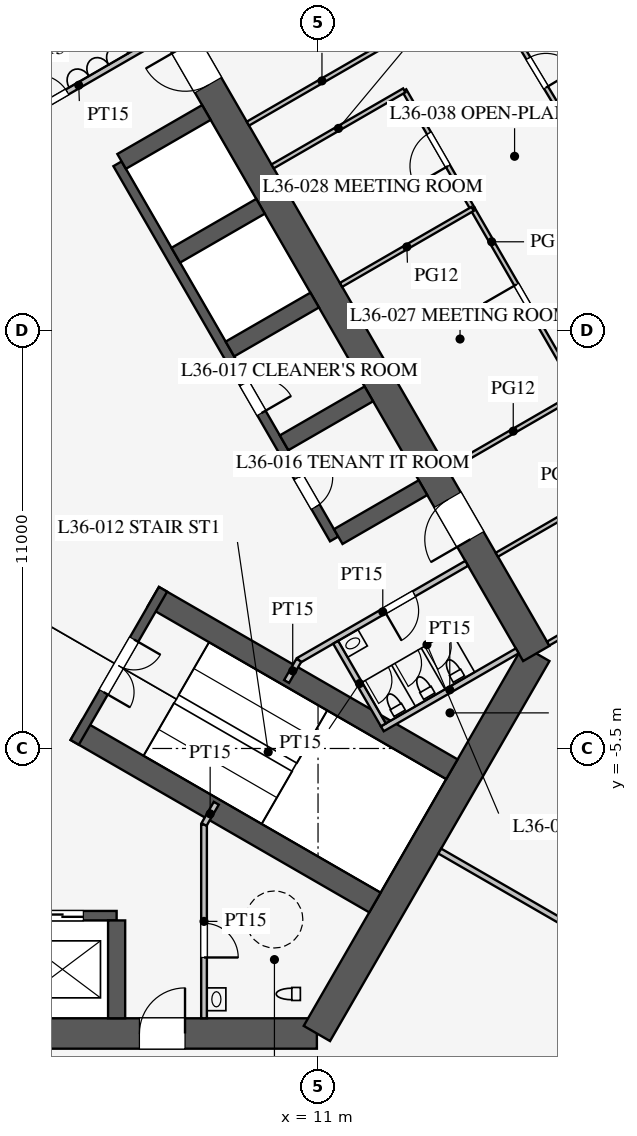
"""IFC4 building model, lengths in metres.
Left out: names, types, materials, properties, quantities, classifications, styles, units other than length and angle.
Written with IfcOpenShell. Run it as: python <this file> out.ifc"""

import sys

from ifc_helpers import new_model, si_unit, direction, frame, frame_2d, origin, place, context, subcontext, project, spatial, rectangle, extrude, element, fill, save


model = new_model("IFC4")
c1 = context("Model", 3, precision=1e-05, world=origin(), true_north=direction((0.0, 1.0)))
c2 = subcontext(c1, "Body", "Model", "MODEL_VIEW")
j1 = project(units=[si_unit("LENGTHUNIT", "METRE"), si_unit("PLANEANGLEUNIT", "RADIAN")], contexts=[c1])
p1 = place(None, origin())
s1 = spatial("IfcSite", under=j1, at=p1, CompositionType="ELEMENT")
p2 = place(p1, origin())
s2 = spatial("IfcBuilding", under=s1, at=p2, CompositionType="ELEMENT")
p3 = place(p2, frame((0.0, 0.0, 157.7)))
s3 = spatial("IfcBuildingStorey", under=s2, at=p3, CompositionType="ELEMENT", Elevation=157.7)
p4 = place(p3, frame((-10.97, -13.0, 0.0), z_axis=(0.0, 0.0, 1.0), x_axis=(1.0, 0.0, 0.0)))
e1 = element("IfcWall", 1, at=p4, inside=s3, PredefinedType="SHEAR", context=c2, shape_type="SweptSolid", body=[
    extrude(rectangle(XDim=21.939, YDim=0.8, at=frame_2d((10.97, 0.0))), origin(), (0.0, 0.0, 1.0), 4.2),
])
p5 = place(p4, frame((17.27, 0.0, 0.0)))
e2 = element("IfcOpeningElement", 2, at=p5, cuts=e1, PredefinedType="OPENING", context=c2, shape_type="SweptSolid", body=[
    extrude(rectangle(XDim=1.2, YDim=2.1, at=frame_2d((0.6, 1.05))), frame((0.0, 0.41, 0.0), z_axis=(0.0, -1.0, 0.0), x_axis=(1.0, 0.0, 0.0)), (0.0, 0.0, 1.0), 0.82),
])
p6 = place(p4, frame((3.47, 0.0, 0.0)))
e3 = element("IfcOpeningElement", 3, at=p6, cuts=e1, PredefinedType="OPENING", context=c2, shape_type="SweptSolid", body=[
    extrude(rectangle(XDim=1.2, YDim=2.1, at=frame_2d((0.6, 1.05))), frame((0.0, 0.41, 0.0), z_axis=(0.0, -1.0, 0.0), x_axis=(1.0, 0.0, 0.0)), (0.0, 0.0, 1.0), 0.82),
])
p7 = place(p3, frame((10.97, -13.0, 0.0), z_axis=(0.0, 0.0, 1.0), x_axis=(0.499995765644, 0.866027848477, 0.0)))
e4 = element("IfcWall", 4, at=p7, inside=s3, PredefinedType="SHEAR", context=c2, shape_type="SweptSolid", body=[
    extrude(rectangle(XDim=11.547, YDim=0.8, at=frame_2d((5.773, 0.0))), origin(), (0.0, 0.0, 1.0), 4.2),
])
p8 = place(p3, frame((16.743, -3.0, 0.0), z_axis=(0.0, 0.0, 1.0), x_axis=(-0.500002442456, 0.866023993627, 0.0)))
e5 = element("IfcWall", 5, at=p8, inside=s3, PredefinedType="SHEAR", context=c2, shape_type="SweptSolid", body=[
    extrude(rectangle(XDim=21.939, YDim=0.8, at=frame_2d((10.97, 0.0))), origin(), (0.0, 0.0, 1.0), 4.2),
])
p9 = place(p8, frame((17.27, 0.0, 0.0)))
e6 = element("IfcOpeningElement", 6, at=p9, cuts=e5, PredefinedType="OPENING", context=c2, shape_type="SweptSolid", body=[
    extrude(rectangle(XDim=1.2, YDim=2.1, at=frame_2d((0.6, 1.05))), frame((0.0, 0.41, 0.0), z_axis=(0.0, -1.0, 0.0), x_axis=(1.0, 0.0, 0.0)), (0.0, 0.0, 1.0), 0.82),
])
p10 = place(p8, frame((3.47, 0.0, 0.0)))
e7 = element("IfcOpeningElement", 7, at=p10, cuts=e5, PredefinedType="OPENING", context=c2, shape_type="SweptSolid", body=[
    extrude(rectangle(XDim=1.2, YDim=2.1, at=frame_2d((0.6, 1.05))), frame((0.0, 0.41, 0.0), z_axis=(0.0, -1.0, 0.0), x_axis=(1.0, 0.0, 0.0)), (0.0, 0.0, 1.0), 0.82),
])
p11 = place(p3, frame((-5.7, -9.9, 0.0), z_axis=(0.0, 0.0, 1.0), x_axis=(1.0, 0.0, 0.0)))
e8 = element("IfcWall", 8, at=p11, inside=s3, PredefinedType="SHEAR", context=c2, shape_type="SweptSolid", body=[
    extrude(rectangle(XDim=11.4, YDim=0.25, at=frame_2d((5.7, 0.0))), origin(), (0.0, 0.0, 1.0), 4.2),
])
p12 = place(p11, frame((0.875, 0.0, 0.0)))
e9 = element("IfcOpeningElement", 9, at=p12, cuts=e8, PredefinedType="OPENING", context=c2, shape_type="SweptSolid", body=[
    extrude(rectangle(XDim=1.1, YDim=2.2, at=frame_2d((0.55, 1.1))), frame((0.0, 0.135, 0.0), z_axis=(0.0, -1.0, 0.0), x_axis=(1.0, 0.0, 0.0)), (0.0, 0.0, 1.0), 0.27),
])
p13 = place(p11, frame((3.725, 0.0, 0.0)))
e10 = element("IfcOpeningElement", 10, at=p13, cuts=e8, PredefinedType="OPENING", context=c2, shape_type="SweptSolid", body=[
    extrude(rectangle(XDim=1.1, YDim=2.2, at=frame_2d((0.55, 1.1))), frame((0.0, 0.135, 0.0), z_axis=(0.0, -1.0, 0.0), x_axis=(1.0, 0.0, 0.0)), (0.0, 0.0, 1.0), 0.27),
])
p14 = place(p11, frame((6.575, 0.0, 0.0)))
e11 = element("IfcOpeningElement", 11, at=p14, cuts=e8, PredefinedType="OPENING", context=c2, shape_type="SweptSolid", body=[
    extrude(rectangle(XDim=1.1, YDim=2.2, at=frame_2d((0.55, 1.1))), frame((0.0, 0.135, 0.0), z_axis=(0.0, -1.0, 0.0), x_axis=(1.0, 0.0, 0.0)), (0.0, 0.0, 1.0), 0.27),
])
p15 = place(p11, frame((9.425, 0.0, 0.0)))
e12 = element("IfcOpeningElement", 12, at=p15, cuts=e8, PredefinedType="OPENING", context=c2, shape_type="SweptSolid", body=[
    extrude(rectangle(XDim=1.1, YDim=2.2, at=frame_2d((0.55, 1.1))), frame((0.0, 0.135, 0.0), z_axis=(0.0, -1.0, 0.0), x_axis=(1.0, 0.0, 0.0)), (0.0, 0.0, 1.0), 0.27),
])
p16 = place(p3, frame((5.7, -10.025, 0.0), z_axis=(0.0, 0.0, 1.0), x_axis=(0.0, -1.0, 0.0)))
e13 = element("IfcWall", 13, at=p16, inside=s3, PredefinedType="SHEAR", context=c2, shape_type="SweptSolid", body=[
    extrude(rectangle(XDim=2.575, YDim=0.45, at=frame_2d((1.288, 0.0))), origin(), (0.0, 0.0, 1.0), 4.2),
])
p17 = place(p3, frame((11.424, 0.014, 0.0), z_axis=(0.0, 0.0, 1.0), x_axis=(-0.500001763848, 0.866024385424, 0.0)))
e14 = element("IfcWall", 14, at=p17, inside=s3, PredefinedType="SHEAR", context=c2, shape_type="SweptSolid", body=[
    extrude(rectangle(XDim=11.4, YDim=0.25, at=frame_2d((5.7, 0.0))), origin(), (0.0, 0.0, 1.0), 4.2),
])
p18 = place(p17, frame((0.975, 0.0, 0.0)))
e15 = element("IfcOpeningElement", 15, at=p18, cuts=e14, PredefinedType="OPENING", context=c2, shape_type="SweptSolid", body=[
    extrude(rectangle(XDim=0.9, YDim=2.1, at=frame_2d((0.45, 1.05))), frame((0.0, 0.135, 0.0), z_axis=(0.0, -1.0, 0.0), x_axis=(1.0, 0.0, 0.0)), (0.0, 0.0, 1.0), 0.27),
])
p19 = place(p17, frame((3.825, 0.0, 0.0)))
e16 = element("IfcOpeningElement", 16, at=p19, cuts=e14, PredefinedType="OPENING", context=c2, shape_type="SweptSolid", body=[
    extrude(rectangle(XDim=0.9, YDim=2.1, at=frame_2d((0.45, 1.05))), frame((0.0, 0.135, 0.0), z_axis=(0.0, -1.0, 0.0), x_axis=(1.0, 0.0, 0.0)), (0.0, 0.0, 1.0), 0.27),
])
for number, where, z_axis, x_axis in (
    (17, (11.532, 0.076, 0.0), (0.0, 0.0, 1.0), (0.866, 0.5, 0.0)),
    (18, (10.107, 2.544, 0.0), (0.0, 0.0, 1.0), (0.866, 0.5, 0.0)),
    (19, (8.682, 5.012, 0.0), (0.0, 0.0, 1.0), (0.866, 0.5, 0.0)),
    (20, (7.257, 7.481, 0.0), (0.0, 0.0, 1.0), (0.866, 0.5, 0.0)),
):
    element("IfcWall", number, at=place(p3, frame(where, z_axis=z_axis, x_axis=x_axis)), inside=s3, PredefinedType="SHEAR", context=c2, shape_type="SweptSolid", body=[
        extrude(rectangle(XDim=2.575, YDim=0.45, at=frame_2d((1.288, 0.0))), origin(), (0.0, 0.0, 1.0), 4.2),
    ])
p20 = place(p3, frame((5.832, 9.949, 0.0), z_axis=(0.0, 0.0, 1.0), x_axis=(0.866029291668, 0.499993265928, 0.0)))
e21 = element("IfcWall", 21, at=p20, inside=s3, PredefinedType="SHEAR", context=c2, shape_type="SweptSolid", body=[
    extrude(rectangle(XDim=2.575, YDim=0.45, at=frame_2d((1.288, 0.0))), origin(), (0.0, 0.0, 1.0), 4.2),
])
for number, where, z_axis, x_axis in (
    (22, (4.638, -5.016, 0.0), (0.0, 0.0, 1.0), (0.866, -0.5, 0.0)),
    (23, (6.663, -1.509, 0.0), (0.0, 0.0, 1.0), (0.866, -0.5, 0.0)),
):
    element("IfcWall", number, at=place(p3, frame(where, z_axis=z_axis, x_axis=x_axis)), inside=s3, PredefinedType="SHEAR", context=c2, shape_type="SweptSolid", body=[
        extrude(rectangle(XDim=9.075, YDim=0.6, at=frame_2d((4.538, 0.0))), origin(), (0.0, 0.0, 1.0), 4.2),
    ])
p21 = place(p3, frame((4.597, -5.339, 0.0), z_axis=(0.0, 0.0, 1.0), x_axis=(0.499984536904, 0.866034331223, 0.0)))
e24 = element("IfcWall", 24, at=p21, inside=s3, PredefinedType="SHEAR", context=c2, shape_type="SweptSolid", body=[
    extrude(rectangle(XDim=4.65, YDim=0.25, at=frame_2d((2.325, 0.0))), origin(), (0.0, 0.0, 1.0), 4.2),
])
p22 = place(p21, frame((1.525, 0.0, 0.0)))
e25 = element("IfcOpeningElement", 25, at=p22, cuts=e24, PredefinedType="OPENING", context=c2, shape_type="SweptSolid", body=[
    extrude(rectangle(XDim=1.6, YDim=2.1, at=frame_2d((0.8, 1.05))), frame((0.0, 0.135, 0.0), z_axis=(0.0, -1.0, 0.0), x_axis=(1.0, 0.0, 0.0)), (0.0, 0.0, 1.0), 0.27),
])
p23 = place(p3, frame((8.0, -7.5, 0.0), z_axis=(0.0, 0.0, 1.0), x_axis=(0.0, -1.0, 0.0)))
e26 = element("IfcWall", 26, at=p23, inside=s3, PredefinedType="PARTITIONING", context=c2, shape_type="SweptSolid", body=[
    extrude(rectangle(XDim=5.1, YDim=0.15, at=frame_2d((2.55, 0.0))), origin(), (0.0, 0.0, 1.0), 4.0),
])
p24 = place(p23, frame((2.6, 0.0, 0.0)))
e27 = element("IfcOpeningElement", 27, at=p24, cuts=e26, PredefinedType="OPENING", context=c2, shape_type="SweptSolid", body=[
    extrude(rectangle(XDim=0.9, YDim=2.1, at=frame_2d((0.45, 1.05))), frame((0.0, 0.085, 0.0), z_axis=(0.0, -1.0, 0.0), x_axis=(1.0, 0.0, 0.0)), (0.0, 0.0, 1.0), 0.17),
])
p25 = place(p3, frame((2.495, 10.678, 0.0), z_axis=(0.0, 0.0, 1.0), x_axis=(0.86602216432, 0.500005610874, 0.0)))
e28 = element("IfcWall", 28, at=p25, inside=s3, PredefinedType="PARTITIONING", context=c2, shape_type="SweptSolid", body=[
    extrude(rectangle(XDim=5.1, YDim=0.15, at=frame_2d((2.55, 0.0))), origin(), (0.0, 0.0, 1.0), 4.0),
])
p26 = place(p25, frame((1.3, 0.0, 0.0)))
e29 = element("IfcOpeningElement", 29, at=p26, cuts=e28, PredefinedType="OPENING", context=c2, shape_type="SweptSolid", body=[
    extrude(rectangle(XDim=0.9, YDim=2.1, at=frame_2d((0.45, 1.05))), frame((0.0, 0.085, 0.0), z_axis=(0.0, -1.0, 0.0), x_axis=(1.0, 0.0, 0.0)), (0.0, 0.0, 1.0), 0.17),
])
p27 = place(p3, frame((10.495, -3.178, 0.0), z_axis=(0.0, 0.0, 1.0), x_axis=(0.86602216432, 0.500005610874, 0.0)))
e30 = element("IfcWall", 30, at=p27, inside=s3, PredefinedType="PARTITIONING", context=c2, shape_type="SweptSolid", body=[
    extrude(rectangle(XDim=5.1, YDim=0.15, at=frame_2d((2.55, 0.0))), origin(), (0.0, 0.0, 1.0), 4.0),
])
p28 = place(p27, frame((2.6, 0.0, 0.0)))
e31 = element("IfcOpeningElement", 31, at=p28, cuts=e30, PredefinedType="OPENING", context=c2, shape_type="SweptSolid", body=[
    extrude(rectangle(XDim=0.9, YDim=2.1, at=frame_2d((0.45, 1.05))), frame((0.0, 0.085, 0.0), z_axis=(0.0, -1.0, 0.0), x_axis=(1.0, 0.0, 0.0)), (0.0, 0.0, 1.0), 0.17),
])
for number, where, z_axis, x_axis in (
    (32, (8.0, -7.5, 0.0), (0.0, 0.0, 1.0), (0.5, 0.866, 0.0)),
    (33, (10.495, -3.178, 0.0), (0.0, 0.0, 1.0), (-0.5, -0.866, 0.0)),
):
    element("IfcWall", number, at=place(p3, frame(where, z_axis=z_axis, x_axis=x_axis)), inside=s3, PredefinedType="PARTITIONING", context=c2, shape_type="SweptSolid", body=[
        extrude(rectangle(XDim=0.645, YDim=0.15, at=frame_2d((0.323, 0.0))), origin(), (0.0, 0.0, 1.0), 4.0),
    ])
p29 = place(p3, frame((12.691, -4.982, 0.0), z_axis=(0.0, 0.0, 1.0), x_axis=(0.8660249478, 0.500000789788, 0.0)))
e34 = element("IfcWall", 34, at=p29, inside=s3, PredefinedType="PARTITIONING", context=c2, shape_type="SweptSolid", body=[
    extrude(rectangle(XDim=4.1, YDim=0.15, at=frame_2d((2.05, 0.0))), origin(), (0.0, 0.0, 1.0), 4.0),
])
p30 = place(p3, frame((11.464, -2.706, 0.0), z_axis=(0.0, 0.0, 1.0), x_axis=(0.50001992892, -0.866013897511, 0.0)))
e35 = element("IfcWall", 35, at=p30, inside=s3, PredefinedType="PARTITIONING", context=c2, shape_type="SweptSolid", body=[
    extrude(rectangle(XDim=2.51, YDim=0.15, at=frame_2d((1.255, 0.0))), origin(), (0.0, 0.0, 1.0), 4.0),
])
p31 = place(p3, frame((14.203, -8.2, 0.0), z_axis=(0.0, 0.0, 1.0), x_axis=(0.866024668836, -0.500001272966, 0.0)))
e36 = element("IfcWall", 36, at=p31, inside=s3, PredefinedType="PARTITIONING", context=c2, shape_type="SweptSolid", body=[
    extrude(rectangle(XDim=16.65, YDim=0.15, at=frame_2d((8.325, 0.0))), origin(), (0.0, 0.0, 1.0), 2.3),
])
p32 = place(p3, frame((15.069, 8.7, 0.0), z_axis=(0.0, 0.0, 1.0), x_axis=(-0.500012057535, 0.866018442252, 0.0)))
e37 = element("IfcWall", 37, at=p32, inside=s3, PredefinedType="PARTITIONING", context=c2, shape_type="SweptSolid", body=[
    extrude(rectangle(XDim=3.6, YDim=0.12, at=frame_2d((1.8, 0.0))), origin(), (0.0, 0.0, 1.0), 2.9),
])
p33 = place(p32, frame((1.3, 0.0, 0.15)))
e38 = element("IfcOpeningElement", 38, at=p33, cuts=e37, PredefinedType="OPENING", context=c2, shape_type="SweptSolid", body=[
    extrude(rectangle(XDim=1.0, YDim=2.1, at=frame_2d((0.5, 1.05))), frame((0.0, 0.07, 0.0), z_axis=(0.0, -1.0, 0.0), x_axis=(1.0, 0.0, 0.0)), (0.0, 0.0, 1.0), 0.14),
])
p34 = place(p3, frame((17.869, 3.85, 0.0), z_axis=(0.0, 0.0, 1.0), x_axis=(-0.500016814911, 0.866015695474, 0.0)))
e39 = element("IfcWall", 39, at=p34, inside=s3, PredefinedType="PARTITIONING", context=c2, shape_type="SweptSolid", body=[
    extrude(rectangle(XDim=5.6, YDim=0.12, at=frame_2d((2.8, 0.0))), origin(), (0.0, 0.0, 1.0), 2.9),
])
p35 = place(p34, frame((2.3, 0.0, 0.15)))
e40 = element("IfcOpeningElement", 40, at=p35, cuts=e39, PredefinedType="OPENING", context=c2, shape_type="SweptSolid", body=[
    extrude(rectangle(XDim=1.0, YDim=2.1, at=frame_2d((0.5, 1.05))), frame((0.0, 0.07, 0.0), z_axis=(0.0, -1.0, 0.0), x_axis=(1.0, 0.0, 0.0)), (0.0, 0.0, 1.0), 0.14),
])
p36 = place(p3, frame((9.805, 9.818, 0.0), z_axis=(0.0, 0.0, 1.0), x_axis=(0.866026010844, 0.49999894854, 0.0)))
e41 = element("IfcWall", 41, at=p36, inside=s3, PredefinedType="PARTITIONING", context=c2, shape_type="SweptSolid", body=[
    extrude(rectangle(XDim=4.0, YDim=0.12, at=frame_2d((2.0, 0.0))), origin(), (0.0, 0.0, 1.0), 2.9),
])
p37 = place(p3, frame((9.155, 10.944, 0.0), z_axis=(0.0, 0.0, 1.0), x_axis=(0.866017533419, 0.500013631625, 0.0)))
e42 = element("IfcWall", 42, at=p37, inside=s3, PredefinedType="PARTITIONING", context=c2, shape_type="SweptSolid", body=[
    extrude(rectangle(XDim=4.5, YDim=0.12, at=frame_2d((2.25, 0.0))), origin(), (0.0, 0.0, 1.0), 2.9),
])
p38 = place(p3, frame((11.605, 6.7, 0.0), z_axis=(0.0, 0.0, 1.0), x_axis=(0.866026010844, 0.49999894854, 0.0)))
e43 = element("IfcWall", 43, at=p38, inside=s3, PredefinedType="PARTITIONING", context=c2, shape_type="SweptSolid", body=[
    extrude(rectangle(XDim=4.0, YDim=0.12, at=frame_2d((2.0, 0.0))), origin(), (0.0, 0.0, 1.0), 2.8),
])
for number, where, z_axis, x_axis in (
    (44, (17.055, -2.74, 0.0), (0.0, 0.0, 1.0), (0.866, 0.5, 0.0)),
    (45, (14.405, 1.85, 0.0), (0.0, 0.0, 1.0), (0.866, 0.5, 0.0)),
    (46, (15.705, -0.401, 0.0), (0.0, 0.0, 1.0), (0.866, 0.5, 0.0)),
):
    element("IfcWall", number, at=place(p3, frame(where, z_axis=z_axis, x_axis=x_axis)), inside=s3, PredefinedType="PARTITIONING", context=c2, shape_type="SweptSolid", body=[
        extrude(rectangle(XDim=4.0, YDim=0.12, at=frame_2d((2.0, 0.0))), origin(), (0.0, 0.0, 1.0), 2.9),
    ])
p39 = place(p3, frame((17.927, 10.35, 0.0), z_axis=(0.0, 0.0, 1.0), x_axis=(-0.515548366618, 0.856860479703, 0.0)))
e47 = element("IfcWall", 47, at=p39, inside=s3, PredefinedType="PARTITIONING", context=c2, shape_type="SweptSolid", body=[
    extrude(rectangle(XDim=4.501, YDim=0.12, at=frame_2d((2.25, 0.0))), origin(), (0.0, 0.0, 1.0), 2.9),
])
p40 = place(p39, frame((1.8, 0.0, 0.15)))
e48 = element("IfcOpeningElement", 48, at=p40, cuts=e47, PredefinedType="OPENING", context=c2, shape_type="SweptSolid", body=[
    extrude(rectangle(XDim=0.9, YDim=2.1, at=frame_2d((0.45, 1.05))), frame((0.0, 0.07, 0.0), z_axis=(0.0, -1.0, 0.0), x_axis=(1.0, 0.0, 0.0)), (0.0, 0.0, 1.0), 0.14),
])
p41 = place(p24, origin())
e49 = element("IfcDoor", 49, at=p41, inside=s3, OperationType="SINGLE_SWING_RIGHT", PredefinedType="DOOR", context=c2, shape_type="SweptSolid", body=[
    extrude(rectangle(XDim=0.9, YDim=2.1, at=frame_2d((0.45, 1.05))), frame((0.0, 0.025, 0.0), z_axis=(0.0, -1.0, 0.0), x_axis=(1.0, 0.0, 0.0)), (0.0, 0.0, 1.0), 0.05),
])
fill(e27, e49)
p42 = place(p26, origin())
e50 = element("IfcDoor", 50, at=p42, inside=s3, OperationType="SINGLE_SWING_LEFT", PredefinedType="DOOR", context=c2, shape_type="SweptSolid", body=[
    extrude(rectangle(XDim=0.9, YDim=2.1, at=frame_2d((0.45, 1.05))), frame((0.0, 0.025, 0.0), z_axis=(0.0, -1.0, 0.0), x_axis=(1.0, 0.0, 0.0)), (0.0, 0.0, 1.0), 0.05),
])
fill(e29, e50)
p43 = place(p28, frame((0.9, 0.0, 0.0), z_axis=(0.0, 0.0, 1.0), x_axis=(-1.0, 0.0, 0.0)))
e51 = element("IfcDoor", 51, at=p43, inside=s3, OperationType="SINGLE_SWING_RIGHT", PredefinedType="DOOR", context=c2, shape_type="SweptSolid", body=[
    extrude(rectangle(XDim=0.9, YDim=2.1, at=frame_2d((0.45, 1.05))), frame((0.0, 0.025, 0.0), z_axis=(0.0, -1.0, 0.0), x_axis=(1.0, 0.0, 0.0)), (0.0, 0.0, 1.0), 0.05),
])
fill(e31, e51)
p44 = place(p22, frame((1.6, 0.0, 0.0), z_axis=(0.0, 0.0, 1.0), x_axis=(-1.0, 0.0, 0.0)))
e52 = element("IfcDoor", 52, at=p44, inside=s3, OperationType="DOUBLE_DOOR_SINGLE_SWING", PredefinedType="DOOR", context=c2, shape_type="SweptSolid", body=[
    extrude(rectangle(XDim=1.6, YDim=2.1, at=frame_2d((0.8, 1.05))), frame((0.0, 0.025, 0.0), z_axis=(0.0, -1.0, 0.0), x_axis=(1.0, 0.0, 0.0)), (0.0, 0.0, 1.0), 0.05),
])
fill(e25, e52)
p45 = place(p5, origin())
e53 = element("IfcDoor", 53, at=p45, inside=s3, OperationType="SINGLE_SWING_RIGHT", PredefinedType="DOOR", context=c2, shape_type="SweptSolid", body=[
    extrude(rectangle(XDim=1.2, YDim=2.1, at=frame_2d((0.6, 1.05))), frame((0.0, 0.025, 0.0), z_axis=(0.0, -1.0, 0.0), x_axis=(1.0, 0.0, 0.0)), (0.0, 0.0, 1.0), 0.05),
])
fill(e2, e53)
p46 = place(p9, origin())
e54 = element("IfcDoor", 54, at=p46, inside=s3, OperationType="SINGLE_SWING_RIGHT", PredefinedType="DOOR", context=c2, shape_type="SweptSolid", body=[
    extrude(rectangle(XDim=1.2, YDim=2.1, at=frame_2d((0.6, 1.05))), frame((0.0, 0.025, 0.0), z_axis=(0.0, -1.0, 0.0), x_axis=(1.0, 0.0, 0.0)), (0.0, 0.0, 1.0), 0.05),
])
fill(e6, e54)
p47 = place(p10, origin())
e55 = element("IfcDoor", 55, at=p47, inside=s3, OperationType="SINGLE_SWING_LEFT", PredefinedType="DOOR", context=c2, shape_type="SweptSolid", body=[
    extrude(rectangle(XDim=1.2, YDim=2.1, at=frame_2d((0.6, 1.05))), frame((0.0, 0.025, 0.0), z_axis=(0.0, -1.0, 0.0), x_axis=(1.0, 0.0, 0.0)), (0.0, 0.0, 1.0), 0.05),
])
fill(e7, e55)
p48 = place(p18, frame((0.9, 0.0, 0.0), z_axis=(0.0, 0.0, 1.0), x_axis=(-1.0, 0.0, 0.0)))
e56 = element("IfcDoor", 56, at=p48, inside=s3, OperationType="SINGLE_SWING_LEFT", PredefinedType="DOOR", context=c2, shape_type="SweptSolid", body=[
    extrude(rectangle(XDim=0.9, YDim=2.1, at=frame_2d((0.45, 1.05))), frame((0.0, 0.025, 0.0), z_axis=(0.0, -1.0, 0.0), x_axis=(1.0, 0.0, 0.0)), (0.0, 0.0, 1.0), 0.05),
])
fill(e15, e56)
p49 = place(p19, frame((0.9, 0.0, 0.0), z_axis=(0.0, 0.0, 1.0), x_axis=(-1.0, 0.0, 0.0)))
e57 = element("IfcDoor", 57, at=p49, inside=s3, OperationType="SINGLE_SWING_RIGHT", PredefinedType="DOOR", context=c2, shape_type="SweptSolid", body=[
    extrude(rectangle(XDim=0.9, YDim=2.1, at=frame_2d((0.45, 1.05))), frame((0.0, 0.025, 0.0), z_axis=(0.0, -1.0, 0.0), x_axis=(1.0, 0.0, 0.0)), (0.0, 0.0, 1.0), 0.05),
])
fill(e16, e57)
p50 = place(p35, origin())
e58 = element("IfcDoor", 58, at=p50, inside=s3, OperationType="SINGLE_SWING_RIGHT", PredefinedType="DOOR", context=c2, shape_type="SweptSolid", body=[
    extrude(rectangle(XDim=1.0, YDim=2.1, at=frame_2d((0.5, 1.05))), frame((0.0, 0.025, 0.0), z_axis=(0.0, -1.0, 0.0), x_axis=(1.0, 0.0, 0.0)), (0.0, 0.0, 1.0), 0.05),
])
fill(e40, e58)
p51 = place(p33, origin())
e59 = element("IfcDoor", 59, at=p51, inside=s3, OperationType="SINGLE_SWING_LEFT", PredefinedType="DOOR", context=c2, shape_type="SweptSolid", body=[
    extrude(rectangle(XDim=1.0, YDim=2.1, at=frame_2d((0.5, 1.05))), frame((0.0, 0.025, 0.0), z_axis=(0.0, -1.0, 0.0), x_axis=(1.0, 0.0, 0.0)), (0.0, 0.0, 1.0), 0.05),
])
fill(e38, e59)
p52 = place(p40, frame((0.9, 0.0, 0.0), z_axis=(0.0, 0.0, 1.0), x_axis=(-1.0, 0.0, 0.0)))
e60 = element("IfcDoor", 60, at=p52, inside=s3, OperationType="SINGLE_SWING_RIGHT", PredefinedType="DOOR", context=c2, shape_type="SweptSolid", body=[
    extrude(rectangle(XDim=0.9, YDim=2.1, at=frame_2d((0.45, 1.05))), frame((0.0, 0.025, 0.0), z_axis=(0.0, -1.0, 0.0), x_axis=(1.0, 0.0, 0.0)), (0.0, 0.0, 1.0), 0.05),
])
fill(e48, e60)
p53 = place(p15, origin())
e61 = element("IfcDoor", 61, at=p53, inside=s3, OperationType="DOUBLE_DOOR_SLIDING", PredefinedType="DOOR", context=c2, shape_type="SweptSolid", body=[
    extrude(rectangle(XDim=1.1, YDim=2.2, at=frame_2d((0.55, 1.1))), frame((0.0, 0.025, 0.0), z_axis=(0.0, -1.0, 0.0), x_axis=(1.0, 0.0, 0.0)), (0.0, 0.0, 1.0), 0.05),
])
fill(e12, e61)
save(model, sys.argv[1])
